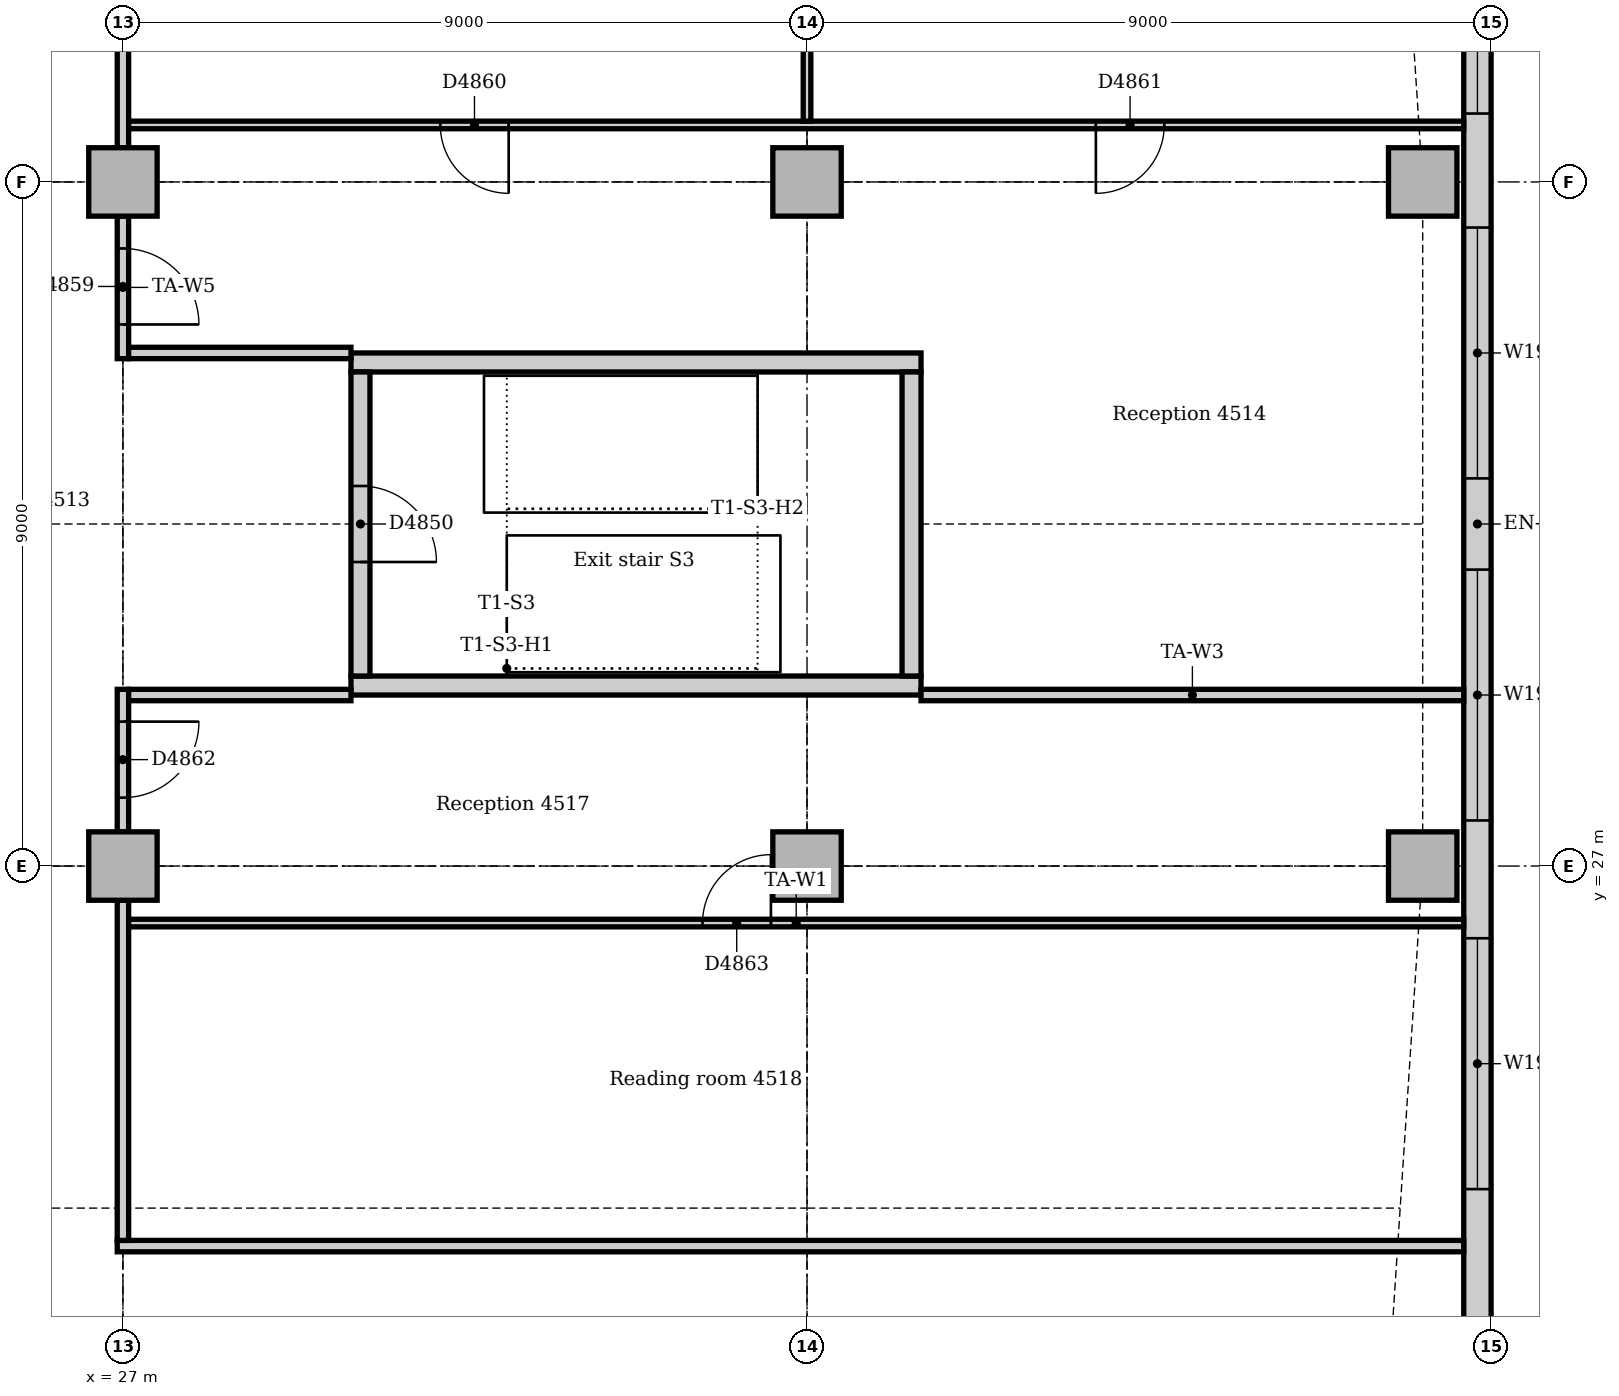
"""IFC4 building model, lengths in metres.
Left out: names, types, materials, properties, quantities, classifications, styles, units other than length and angle.
Written with IfcOpenShell. Run it as: python <this file> out.ifc"""

import sys

from ifc_helpers import new_model, si_unit, direction, frame, frame_2d, origin, origin_2d, place, context, subcontext, project, spatial, rectangle, extrude, element, fill, save


model = new_model("IFC4")
c1 = context("Model", 3, precision=1e-05, world=origin(), true_north=direction((0.0, 1.0)))
c2 = subcontext(c1, "Body", "Model", "MODEL_VIEW")
j1 = project(units=[si_unit("LENGTHUNIT", "METRE"), si_unit("PLANEANGLEUNIT", "RADIAN")], contexts=[c1])
p1 = place(None, origin())
s1 = spatial("IfcSite", under=j1, at=p1, CompositionType="ELEMENT")
p2 = place(p1, origin())
s2 = spatial("IfcBuilding", under=s1, at=p2, CompositionType="ELEMENT")
p3 = place(p2, frame((0.0, 0.0, 189.0)))
s3 = spatial("IfcBuildingStorey", under=s2, at=p3, CompositionType="ELEMENT", Elevation=189.0)
for number, where, z_axis, x_axis in (
    (1, (30.0, 29.375, 0.0), (0.0, 0.0, 1.0), (1.0, 0.0, 0.0)),
    (2, (37.5, 33.625, 0.0), (0.0, 0.0, 1.0), (-1.0, 0.0, 0.0)),
):
    element("IfcWall", number, at=place(p3, frame(where, z_axis=z_axis, x_axis=x_axis)), inside=s3, PredefinedType="SOLIDWALL", context=c2, shape_type="SweptSolid", body=[
        extrude(rectangle(XDim=7.5, YDim=0.25, at=frame_2d((3.75, 0.0))), origin(), (0.0, 0.0, 1.0), 4.0),
    ])
p4 = place(p3, frame((37.375, 29.5, 0.0), z_axis=(0.0, 0.0, 1.0), x_axis=(0.0, 1.0, 0.0)))
e3 = element("IfcWall", 3, at=p4, inside=s3, PredefinedType="SOLIDWALL", context=c2, shape_type="SweptSolid", body=[
    extrude(rectangle(XDim=4.0, YDim=0.25, at=frame_2d((2.0, 0.0))), origin(), (0.0, 0.0, 1.0), 4.0),
])
p5 = place(p3, frame((30.125, 33.5, 0.0), z_axis=(0.0, 0.0, 1.0), x_axis=(0.0, -1.0, 0.0)))
e4 = element("IfcWall", 4, at=p5, inside=s3, PredefinedType="SOLIDWALL", context=c2, shape_type="SweptSolid", body=[
    extrude(rectangle(XDim=4.0, YDim=0.25, at=frame_2d((2.0, 0.0))), origin(), (0.0, 0.0, 1.0), 4.0),
])
p6 = place(p5, frame((1.5, 0.0, 0.0)))
e5 = element("IfcOpeningElement", 5, at=p6, cuts=e4, PredefinedType="OPENING", context=c2, shape_type="SweptSolid", body=[
    extrude(rectangle(XDim=1.0, YDim=2.1, at=frame_2d((0.5, 1.05))), frame((0.0, 0.135, 0.0), z_axis=(0.0, -1.0, 0.0), x_axis=(1.0, 0.0, 0.0)), (0.0, 0.0, 1.0), 0.27),
])
for number, where, z_axis, x_axis in (
    (6, (44.1, 27.0, 0.0), (0.0, 0.0, 1.0), (1.0, 0.0, 0.0)),
    (7, (44.1, 36.0, 0.0), (0.0, 0.0, 1.0), (1.0, 0.0, 0.0)),
    (8, (27.0, 27.0, 0.0), (0.0, 0.0, 1.0), (1.0, 0.0, 0.0)),
    (9, (27.0, 36.0, 0.0), (0.0, 0.0, 1.0), (1.0, 0.0, 0.0)),
    (10, (36.0, 27.0, 0.0), (0.0, 0.0, 1.0), (1.0, 0.0, 0.0)),
    (11, (36.0, 36.0, 0.0), (0.0, 0.0, 1.0), (1.0, 0.0, 0.0)),
):
    element("IfcColumn", number, at=place(p3, frame(where, z_axis=z_axis, x_axis=x_axis)), inside=s3, PredefinedType="COLUMN", context=c2, shape_type="SweptSolid", body=[
        extrude(rectangle(XDim=0.9, YDim=0.9, at=origin_2d()), origin(), (0.0, 0.0, 1.0), 3.7),
    ])
p7 = place(p3, frame((44.82, 19.243, 0.0), z_axis=(0.0, 0.0, 1.0), x_axis=(0.0, 1.0, 0.0)))
e12 = element("IfcWall", 12, at=p7, inside=s3, PredefinedType="STANDARD", context=c2, shape_type="SweptSolid", body=[
    extrude(rectangle(XDim=24.515, YDim=0.36, at=frame_2d((12.257, 0.0))), origin(), (0.0, 0.0, 1.0), 3.7),
])
p8 = place(p7, frame((3.507, 0.0, 0.9)))
e13 = element("IfcOpeningElement", 13, at=p8, cuts=e12, PredefinedType="OPENING", context=c2, shape_type="SweptSolid", body=[
    extrude(rectangle(XDim=3.3, YDim=1.6, at=frame_2d((1.65, 0.8))), frame((0.0, 0.19, 0.0), z_axis=(0.0, -1.0, 0.0), x_axis=(1.0, 0.0, 0.0)), (0.0, 0.0, 1.0), 0.38),
])
p9 = place(p7, frame((8.357, 0.0, 0.9)))
e14 = element("IfcOpeningElement", 14, at=p9, cuts=e12, PredefinedType="OPENING", context=c2, shape_type="SweptSolid", body=[
    extrude(rectangle(XDim=3.3, YDim=1.6, at=frame_2d((1.65, 0.8))), frame((0.0, 0.19, 0.0), z_axis=(0.0, -1.0, 0.0), x_axis=(1.0, 0.0, 0.0)), (0.0, 0.0, 1.0), 0.38),
])
p10 = place(p7, frame((12.857, 0.0, 0.9)))
e15 = element("IfcOpeningElement", 15, at=p10, cuts=e12, PredefinedType="OPENING", context=c2, shape_type="SweptSolid", body=[
    extrude(rectangle(XDim=3.3, YDim=1.6, at=frame_2d((1.65, 0.8))), frame((0.0, 0.19, 0.0), z_axis=(0.0, -1.0, 0.0), x_axis=(1.0, 0.0, 0.0)), (0.0, 0.0, 1.0), 0.38),
])
p11 = place(p7, frame((17.657, 0.0, 0.9)))
e16 = element("IfcOpeningElement", 16, at=p11, cuts=e12, PredefinedType="OPENING", context=c2, shape_type="SweptSolid", body=[
    extrude(rectangle(XDim=3.3, YDim=1.6, at=frame_2d((1.65, 0.8))), frame((0.0, 0.19, 0.0), z_axis=(0.0, -1.0, 0.0), x_axis=(1.0, 0.0, 0.0)), (0.0, 0.0, 1.0), 0.38),
])
p12 = place(p3, frame((26.925, 22.0, 0.0), z_axis=(0.0, 0.0, 1.0), x_axis=(1.0, 0.0, 0.0)))
e17 = element("IfcWall", 17, at=p12, inside=s3, PredefinedType="PARTITIONING", context=c2, shape_type="SweptSolid", body=[
    extrude(rectangle(XDim=17.715, YDim=0.15, at=frame_2d((8.857, 0.0))), origin(), (0.0, 0.0, 1.0), 3.7),
])
p13 = place(p3, frame((27.0, 33.675, 0.0), z_axis=(0.0, 0.0, 1.0), x_axis=(0.0, 1.0, 0.0)))
e18 = element("IfcWall", 18, at=p13, inside=s3, PredefinedType="PARTITIONING", context=c2, shape_type="SweptSolid", body=[
    extrude(rectangle(XDim=1.875, YDim=0.15, at=frame_2d((0.938, 0.0))), origin(), (0.0, 0.0, 1.0), 3.212),
])
p14 = place(p13, frame((0.45, 0.0, 0.0)))
e19 = element("IfcOpeningElement", 19, at=p14, cuts=e18, PredefinedType="OPENING", context=c2, shape_type="SweptSolid", body=[
    extrude(rectangle(XDim=1.0, YDim=2.1, at=frame_2d((0.5, 1.05))), frame((0.0, 0.085, 0.0), z_axis=(0.0, -1.0, 0.0), x_axis=(1.0, 0.0, 0.0)), (0.0, 0.0, 1.0), 0.17),
])
p15 = place(p3, frame((27.0, 36.45, 0.0), z_axis=(0.0, 0.0, 1.0), x_axis=(0.0, 1.0, 0.0)))
e20 = element("IfcWall", 20, at=p15, inside=s3, PredefinedType="PARTITIONING", context=c2, shape_type="SweptSolid", body=[
    extrude(rectangle(XDim=7.2, YDim=0.15, at=frame_2d((3.6, 0.0))), origin(), (0.0, 0.0, 1.0), 3.212),
])
p16 = place(p3, frame((27.0, 22.075, 0.0), z_axis=(0.0, 0.0, 1.0), x_axis=(0.0, 1.0, 0.0)))
e21 = element("IfcWall", 21, at=p16, inside=s3, PredefinedType="PARTITIONING", context=c2, shape_type="SweptSolid", body=[
    extrude(rectangle(XDim=4.475, YDim=0.15, at=frame_2d((2.237, 0.0))), origin(), (0.0, 0.0, 1.0), 3.212),
])
p17 = place(p3, frame((27.0, 27.45, 0.0), z_axis=(0.0, 0.0, 1.0), x_axis=(0.0, 1.0, 0.0)))
e22 = element("IfcWall", 22, at=p17, inside=s3, PredefinedType="PARTITIONING", context=c2, shape_type="SweptSolid", body=[
    extrude(rectangle(XDim=1.875, YDim=0.15, at=frame_2d((0.938, 0.0))), origin(), (0.0, 0.0, 1.0), 3.212),
])
p18 = place(p17, frame((0.45, 0.0, 0.0)))
e23 = element("IfcOpeningElement", 23, at=p18, cuts=e22, PredefinedType="OPENING", context=c2, shape_type="SweptSolid", body=[
    extrude(rectangle(XDim=1.0, YDim=2.1, at=frame_2d((0.5, 1.05))), frame((0.0, 0.085, 0.0), z_axis=(0.0, -1.0, 0.0), x_axis=(1.0, 0.0, 0.0)), (0.0, 0.0, 1.0), 0.17),
])
for number, where, z_axis, x_axis in (
    (24, (27.075, 29.25, 0.0), (0.0, 0.0, 1.0), (1.0, 0.0, 0.0)),
    (25, (27.075, 33.75, 0.0), (0.0, 0.0, 1.0), (1.0, 0.0, 0.0)),
):
    element("IfcWall", number, at=place(p3, frame(where, z_axis=z_axis, x_axis=x_axis)), inside=s3, PredefinedType="PARTITIONING", context=c2, shape_type="SweptSolid", body=[
        extrude(rectangle(XDim=2.925, YDim=0.15, at=frame_2d((1.462, 0.0))), origin(), (0.0, 0.0, 1.0), 3.7),
    ])
p19 = place(p3, frame((37.5, 29.25, 0.0), z_axis=(0.0, 0.0, 1.0), x_axis=(1.0, 0.0, 0.0)))
e26 = element("IfcWall", 26, at=p19, inside=s3, PredefinedType="PARTITIONING", context=c2, shape_type="SweptSolid", body=[
    extrude(rectangle(XDim=7.14, YDim=0.15, at=frame_2d((3.57, 0.0))), origin(), (0.0, 0.0, 1.0), 3.7),
])
p20 = place(p3, frame((27.075, 26.25, 0.0), z_axis=(0.0, 0.0, 1.0), x_axis=(1.0, 0.0, 0.0)))
e27 = element("IfcWall", 27, at=p20, inside=s3, PredefinedType="PARTITIONING", context=c2, shape_type="SweptSolid", body=[
    extrude(rectangle(XDim=17.565, YDim=0.1, at=frame_2d((8.783, 0.0))), origin(), (0.0, 0.0, 1.0), 3.7),
])
p21 = place(p20, frame((7.55, 0.0, 0.0)))
e28 = element("IfcOpeningElement", 28, at=p21, cuts=e27, PredefinedType="OPENING", context=c2, shape_type="SweptSolid", body=[
    extrude(rectangle(XDim=0.9, YDim=2.1, at=frame_2d((0.45, 1.05))), frame((0.0, 0.06, 0.0), z_axis=(0.0, -1.0, 0.0), x_axis=(1.0, 0.0, 0.0)), (0.0, 0.0, 1.0), 0.12),
])
p22 = place(p3, frame((27.075, 36.75, 0.0), z_axis=(0.0, 0.0, 1.0), x_axis=(1.0, 0.0, 0.0)))
e29 = element("IfcWall", 29, at=p22, inside=s3, PredefinedType="PARTITIONING", context=c2, shape_type="SweptSolid", body=[
    extrude(rectangle(XDim=17.565, YDim=0.1, at=frame_2d((8.783, 0.0))), origin(), (0.0, 0.0, 1.0), 3.7),
])
p23 = place(p22, frame((4.1, 0.0, 0.0)))
e30 = element("IfcOpeningElement", 30, at=p23, cuts=e29, PredefinedType="OPENING", context=c2, shape_type="SweptSolid", body=[
    extrude(rectangle(XDim=0.9, YDim=2.1, at=frame_2d((0.45, 1.05))), frame((0.0, 0.06, 0.0), z_axis=(0.0, -1.0, 0.0), x_axis=(1.0, 0.0, 0.0)), (0.0, 0.0, 1.0), 0.12),
])
p24 = place(p22, frame((12.725, 0.0, 0.0)))
e31 = element("IfcOpeningElement", 31, at=p24, cuts=e29, PredefinedType="OPENING", context=c2, shape_type="SweptSolid", body=[
    extrude(rectangle(XDim=0.9, YDim=2.1, at=frame_2d((0.45, 1.05))), frame((0.0, 0.06, 0.0), z_axis=(0.0, -1.0, 0.0), x_axis=(1.0, 0.0, 0.0)), (0.0, 0.0, 1.0), 0.12),
])
p25 = place(p3, frame((36.0, 36.8, 0.0), z_axis=(0.0, 0.0, 1.0), x_axis=(0.0, 1.0, 0.0)))
e32 = element("IfcWall", 32, at=p25, inside=s3, PredefinedType="PARTITIONING", context=c2, shape_type="SweptSolid", body=[
    extrude(rectangle(XDim=6.85, YDim=0.1, at=frame_2d((3.425, 0.0))), origin(), (0.0, 0.0, 1.0), 3.212),
])
p26 = place(p8, origin())
e33 = element("IfcWindow", 33, at=p26, inside=s3, PartitioningType="SINGLE_PANEL", PredefinedType="WINDOW", context=c2, shape_type="SweptSolid", body=[
    extrude(rectangle(XDim=3.3, YDim=1.6, at=frame_2d((1.65, 0.8))), frame((0.0, 0.13, 0.0), z_axis=(0.0, -1.0, 0.0), x_axis=(1.0, 0.0, 0.0)), (0.0, 0.0, 1.0), 0.06),
])
fill(e13, e33)
p27 = place(p9, origin())
e34 = element("IfcWindow", 34, at=p27, inside=s3, PartitioningType="SINGLE_PANEL", PredefinedType="WINDOW", context=c2, shape_type="SweptSolid", body=[
    extrude(rectangle(XDim=3.3, YDim=1.6, at=frame_2d((1.65, 0.8))), frame((0.0, 0.13, 0.0), z_axis=(0.0, -1.0, 0.0), x_axis=(1.0, 0.0, 0.0)), (0.0, 0.0, 1.0), 0.06),
])
fill(e14, e34)
p28 = place(p10, origin())
e35 = element("IfcWindow", 35, at=p28, inside=s3, PartitioningType="SINGLE_PANEL", PredefinedType="WINDOW", context=c2, shape_type="SweptSolid", body=[
    extrude(rectangle(XDim=3.3, YDim=1.6, at=frame_2d((1.65, 0.8))), frame((0.0, 0.13, 0.0), z_axis=(0.0, -1.0, 0.0), x_axis=(1.0, 0.0, 0.0)), (0.0, 0.0, 1.0), 0.06),
])
fill(e15, e35)
p29 = place(p11, origin())
e36 = element("IfcWindow", 36, at=p29, inside=s3, PartitioningType="SINGLE_PANEL", PredefinedType="WINDOW", context=c2, shape_type="SweptSolid", body=[
    extrude(rectangle(XDim=3.3, YDim=1.6, at=frame_2d((1.65, 0.8))), frame((0.0, 0.13, 0.0), z_axis=(0.0, -1.0, 0.0), x_axis=(1.0, 0.0, 0.0)), (0.0, 0.0, 1.0), 0.06),
])
fill(e16, e36)
p30 = place(p6, origin())
e37 = element("IfcDoor", 37, at=p30, inside=s3, OperationType="SINGLE_SWING_RIGHT", PredefinedType="DOOR", context=c2, shape_type="SweptSolid", body=[
    extrude(rectangle(XDim=1.0, YDim=2.1, at=frame_2d((0.5, 1.05))), frame((0.0, 0.025, 0.0), z_axis=(0.0, -1.0, 0.0), x_axis=(1.0, 0.0, 0.0)), (0.0, 0.0, 1.0), 0.05),
])
fill(e5, e37)
p31 = place(p14, frame((1.0, 0.0, 0.0), z_axis=(0.0, 0.0, 1.0), x_axis=(-1.0, 0.0, 0.0)))
e38 = element("IfcDoor", 38, at=p31, inside=s3, OperationType="SINGLE_SWING_RIGHT", PredefinedType="DOOR", context=c2, shape_type="SweptSolid", body=[
    extrude(rectangle(XDim=1.0, YDim=2.1, at=frame_2d((0.5, 1.05))), frame((0.0, 0.025, 0.0), z_axis=(0.0, -1.0, 0.0), x_axis=(1.0, 0.0, 0.0)), (0.0, 0.0, 1.0), 0.05),
])
fill(e19, e38)
p32 = place(p23, frame((0.9, 0.0, 0.0), z_axis=(0.0, 0.0, 1.0), x_axis=(-1.0, 0.0, 0.0)))
e39 = element("IfcDoor", 39, at=p32, inside=s3, OperationType="SINGLE_SWING_LEFT", PredefinedType="DOOR", context=c2, shape_type="SweptSolid", body=[
    extrude(rectangle(XDim=0.9, YDim=2.1, at=frame_2d((0.45, 1.05))), frame((0.0, 0.025, 0.0), z_axis=(0.0, -1.0, 0.0), x_axis=(1.0, 0.0, 0.0)), (0.0, 0.0, 1.0), 0.05),
])
fill(e30, e39)
p33 = place(p24, frame((0.9, 0.0, 0.0), z_axis=(0.0, 0.0, 1.0), x_axis=(-1.0, 0.0, 0.0)))
e40 = element("IfcDoor", 40, at=p33, inside=s3, OperationType="SINGLE_SWING_RIGHT", PredefinedType="DOOR", context=c2, shape_type="SweptSolid", body=[
    extrude(rectangle(XDim=0.9, YDim=2.1, at=frame_2d((0.45, 1.05))), frame((0.0, 0.025, 0.0), z_axis=(0.0, -1.0, 0.0), x_axis=(1.0, 0.0, 0.0)), (0.0, 0.0, 1.0), 0.05),
])
fill(e31, e40)
p34 = place(p18, frame((1.0, 0.0, 0.0), z_axis=(0.0, 0.0, 1.0), x_axis=(-1.0, 0.0, 0.0)))
e41 = element("IfcDoor", 41, at=p34, inside=s3, OperationType="SINGLE_SWING_LEFT", PredefinedType="DOOR", context=c2, shape_type="SweptSolid", body=[
    extrude(rectangle(XDim=1.0, YDim=2.1, at=frame_2d((0.5, 1.05))), frame((0.0, 0.025, 0.0), z_axis=(0.0, -1.0, 0.0), x_axis=(1.0, 0.0, 0.0)), (0.0, 0.0, 1.0), 0.05),
])
fill(e23, e41)
p35 = place(p21, origin())
e42 = element("IfcDoor", 42, at=p35, inside=s3, OperationType="SINGLE_SWING_RIGHT", PredefinedType="DOOR", context=c2, shape_type="SweptSolid", body=[
    extrude(rectangle(XDim=0.9, YDim=2.1, at=frame_2d((0.45, 1.05))), frame((0.0, 0.025, 0.0), z_axis=(0.0, -1.0, 0.0), x_axis=(1.0, 0.0, 0.0)), (0.0, 0.0, 1.0), 0.05),
])
fill(e28, e42)
save(model, sys.argv[1])
